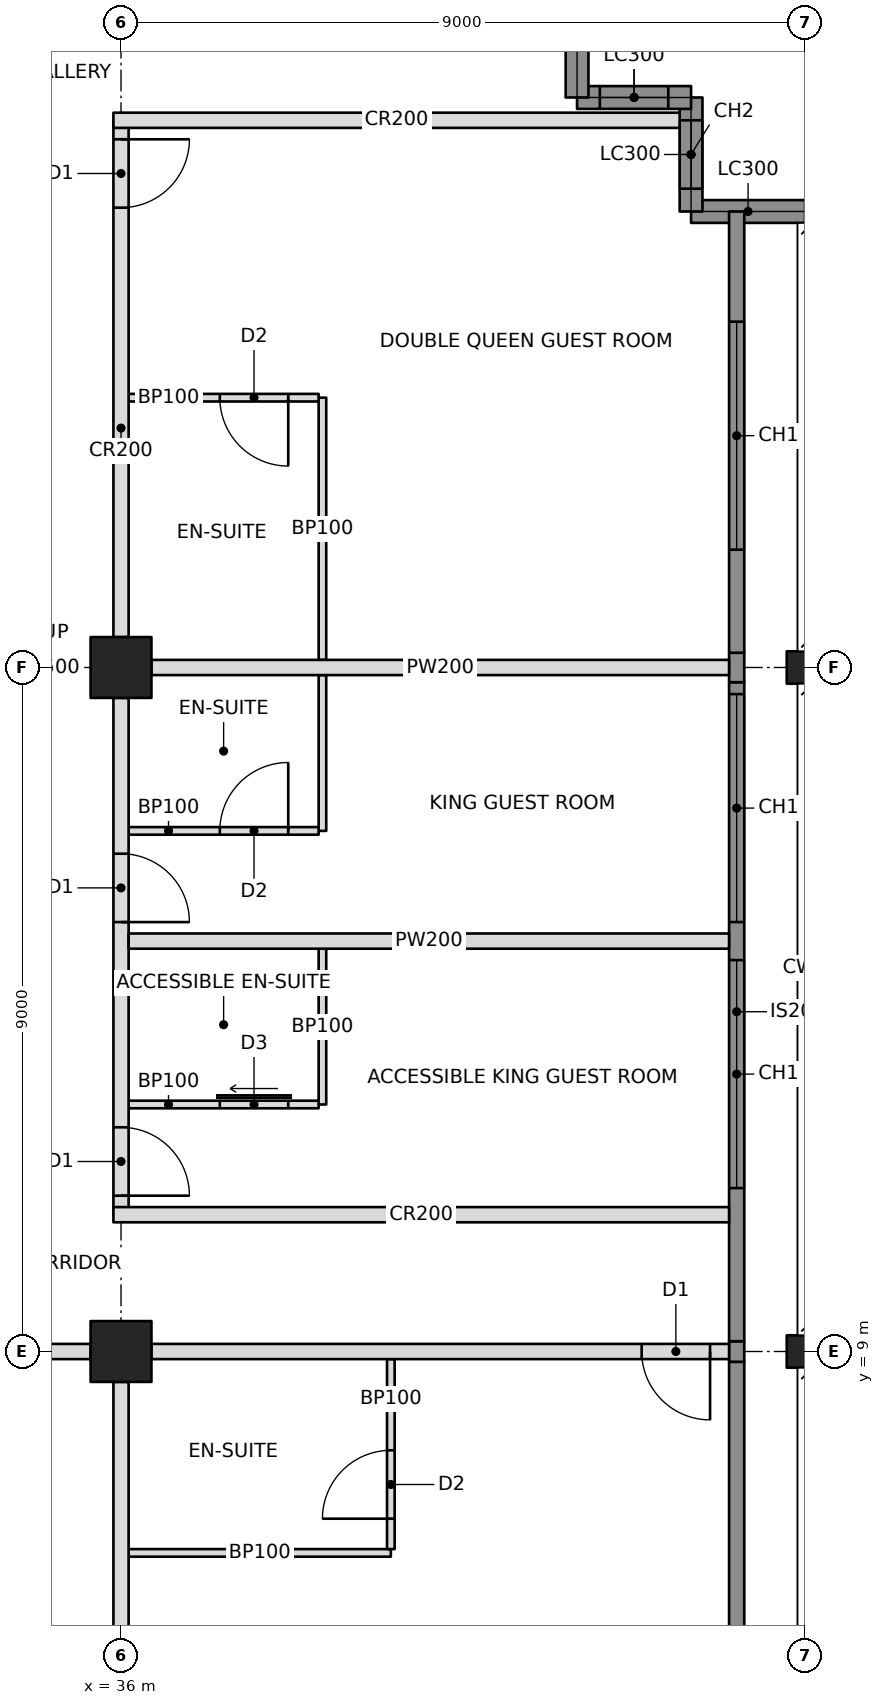
"""IFC4 building model, lengths in metres.
Left out: names, types, materials, properties, quantities, classifications, styles, units other than length and angle.
Written with IfcOpenShell. Run it as: python <this file> out.ifc"""

import sys

from ifc_helpers import new_model, si_unit, direction, frame, frame_2d, origin, origin_2d, place, context, subcontext, project, spatial, rectangle, hollow_rectangle, i_section, extrude, element, fill, save


model = new_model("IFC4")
c1 = context("Model", 3, precision=1e-05, world=origin(), true_north=direction((0.0, 1.0)))
c2 = subcontext(c1, "Body", "Model", "MODEL_VIEW")
j1 = project(units=[si_unit("LENGTHUNIT", "METRE"), si_unit("PLANEANGLEUNIT", "RADIAN")], contexts=[c1])
p1 = place(None, origin())
s1 = spatial("IfcSite", under=j1, at=p1, CompositionType="ELEMENT")
p2 = place(p1, origin())
s2 = spatial("IfcBuilding", under=s1, at=p2, CompositionType="ELEMENT")
p3 = place(p2, frame((0.0, 0.0, 194.4)))
s3 = spatial("IfcBuildingStorey", under=s2, at=p3, CompositionType="ELEMENT", Elevation=194.4)
for number, where, z_axis, x_axis in (
    (1, (36.0, 9.0, 0.0), (0.0, 0.0, 1.0), (0.0, 1.0, 0.0)),
    (2, (36.0, 18.0, 0.0), (0.0, 0.0, 1.0), (0.0, 1.0, 0.0)),
):
    element("IfcColumn", number, at=place(p3, frame(where, z_axis=z_axis, x_axis=x_axis)), inside=s3, PredefinedType="COLUMN", context=c2, shape_type="SweptSolid", body=[
        extrude(hollow_rectangle(XDim=0.8, YDim=0.8, WallThickness=0.05, at=origin_2d()), origin(), (0.0, 0.0, 1.0), 3.4),
    ])
for number, where, z_axis, x_axis in (
    (3, (45.0, 9.0, 0.0), (0.0, 0.0, 1.0), (0.0, 1.0, 0.0)),
    (4, (45.0, 18.0, 0.0), (0.0, 0.0, 1.0), (0.0, 1.0, 0.0)),
):
    element("IfcColumn", number, at=place(p3, frame(where, z_axis=z_axis, x_axis=x_axis)), inside=s3, PredefinedType="COLUMN", context=c2, shape_type="SweptSolid", body=[
        extrude(i_section(OverallWidth=0.427, OverallDepth=0.483, WebThickness=0.051, FlangeThickness=0.082, at=origin_2d()), origin(), (0.0, 0.0, 1.0), 3.4),
    ])
p4 = place(p3, frame((45.0, 24.0, 0.0), z_axis=(0.0, 0.0, 1.0), x_axis=(-1.0, 0.0, 0.0)))
e5 = element("IfcWall", 5, at=p4, inside=s3, PredefinedType="SOLIDWALL", context=c2, shape_type="SweptSolid", body=[
    extrude(rectangle(XDim=1.5, YDim=0.3, at=frame_2d((0.75, 0.0))), origin(), (0.0, 0.0, 1.0), 2.42),
])
p5 = place(p3, frame((43.5, 24.0, 0.0), z_axis=(0.0, 0.0, 1.0), x_axis=(0.0, 1.0, 0.0)))
e6 = element("IfcWall", 6, at=p5, inside=s3, PredefinedType="SOLIDWALL", context=c2, shape_type="SweptSolid", body=[
    extrude(rectangle(XDim=1.5, YDim=0.3, at=frame_2d((0.75, 0.0))), origin(), (0.0, 0.0, 1.0), 3.2),
])
p6 = place(p5, frame((0.3, 0.0, 0.6)))
e7 = element("IfcOpeningElement", 7, at=p6, cuts=e6, PredefinedType="OPENING", context=c2, shape_type="SweptSolid", body=[
    extrude(rectangle(XDim=0.9, YDim=2.2, at=frame_2d((0.45, 1.1))), frame((0.0, 0.16, 0.0), z_axis=(0.0, -1.0, 0.0), x_axis=(1.0, 0.0, 0.0)), (0.0, 0.0, 1.0), 0.32),
])
p7 = place(p3, frame((43.5, 25.5, 0.0), z_axis=(0.0, 0.0, 1.0), x_axis=(-1.0, 0.0, 0.0)))
e8 = element("IfcWall", 8, at=p7, inside=s3, PredefinedType="SOLIDWALL", context=c2, shape_type="SweptSolid", body=[
    extrude(rectangle(XDim=1.5, YDim=0.3, at=frame_2d((0.75, 0.0))), origin(), (0.0, 0.0, 1.0), 3.2),
])
p8 = place(p7, frame((0.3, 0.0, 0.6)))
e9 = element("IfcOpeningElement", 9, at=p8, cuts=e8, PredefinedType="OPENING", context=c2, shape_type="SweptSolid", body=[
    extrude(rectangle(XDim=0.9, YDim=2.2, at=frame_2d((0.45, 1.1))), frame((0.0, 0.16, 0.0), z_axis=(0.0, -1.0, 0.0), x_axis=(1.0, 0.0, 0.0)), (0.0, 0.0, 1.0), 0.32),
])
p9 = place(p3, frame((42.0, 25.5, 0.0), z_axis=(0.0, 0.0, 1.0), x_axis=(0.0, 1.0, 0.0)))
e10 = element("IfcWall", 10, at=p9, inside=s3, PredefinedType="SOLIDWALL", context=c2, shape_type="SweptSolid", body=[
    extrude(rectangle(XDim=1.5, YDim=0.3, at=frame_2d((0.75, 0.0))), origin(), (0.0, 0.0, 1.0), 2.42),
])
p10 = place(p3, frame((27.4, 9.0, 0.0), z_axis=(0.0, 0.0, 1.0), x_axis=(1.0, 0.0, 0.0)))
e11 = element("IfcWall", 11, at=p10, inside=s3, PredefinedType="PARTITIONING", context=c2, shape_type="SweptSolid", body=[
    extrude(rectangle(XDim=8.2, YDim=0.2, at=frame_2d((4.1, 0.0))), origin(), (0.0, 0.0, 1.0), 2.405),
])
p11 = place(p10, frame((0.15, 0.0, 0.0)))
e12 = element("IfcOpeningElement", 12, at=p11, cuts=e11, PredefinedType="OPENING", context=c2, shape_type="SweptSolid", body=[
    extrude(rectangle(XDim=0.9, YDim=2.1, at=frame_2d((0.45, 1.05))), frame((0.0, 0.11, 0.0), z_axis=(0.0, -1.0, 0.0), x_axis=(1.0, 0.0, 0.0)), (0.0, 0.0, 1.0), 0.22),
])
p12 = place(p3, frame((36.4, 9.0, 0.0), z_axis=(0.0, 0.0, 1.0), x_axis=(1.0, 0.0, 0.0)))
e13 = element("IfcWall", 13, at=p12, inside=s3, PredefinedType="PARTITIONING", context=c2, shape_type="SweptSolid", body=[
    extrude(rectangle(XDim=7.6, YDim=0.2, at=frame_2d((3.8, 0.0))), origin(), (0.0, 0.0, 1.0), 2.438),
])
p13 = place(p12, frame((6.45, 0.0, 0.0)))
e14 = element("IfcOpeningElement", 14, at=p13, cuts=e13, PredefinedType="OPENING", context=c2, shape_type="SweptSolid", body=[
    extrude(rectangle(XDim=0.9, YDim=2.1, at=frame_2d((0.45, 1.05))), frame((0.0, 0.11, 0.0), z_axis=(0.0, -1.0, 0.0), x_axis=(1.0, 0.0, 0.0)), (0.0, 0.0, 1.0), 0.22),
])
p14 = place(p3, frame((36.0, 10.8, 0.0), z_axis=(0.0, 0.0, 1.0), x_axis=(0.0, 1.0, 0.0)))
e15 = element("IfcWall", 15, at=p14, inside=s3, PredefinedType="PARTITIONING", context=c2, shape_type="SweptSolid", body=[
    extrude(rectangle(XDim=6.8, YDim=0.2, at=frame_2d((3.4, 0.0))), origin(), (0.0, 0.0, 1.0), 2.405),
])
p15 = place(p14, frame((0.25, 0.0, 0.0)))
e16 = element("IfcOpeningElement", 16, at=p15, cuts=e15, PredefinedType="OPENING", context=c2, shape_type="SweptSolid", body=[
    extrude(rectangle(XDim=0.9, YDim=2.1, at=frame_2d((0.45, 1.05))), frame((0.0, 0.11, 0.0), z_axis=(0.0, -1.0, 0.0), x_axis=(1.0, 0.0, 0.0)), (0.0, 0.0, 1.0), 0.22),
])
p16 = place(p14, frame((3.85, 0.0, 0.0)))
e17 = element("IfcOpeningElement", 17, at=p16, cuts=e15, PredefinedType="OPENING", context=c2, shape_type="SweptSolid", body=[
    extrude(rectangle(XDim=0.9, YDim=2.1, at=frame_2d((0.45, 1.05))), frame((0.0, 0.11, 0.0), z_axis=(0.0, -1.0, 0.0), x_axis=(1.0, 0.0, 0.0)), (0.0, 0.0, 1.0), 0.22),
])
p17 = place(p3, frame((36.0, 18.4, 0.0), z_axis=(0.0, 0.0, 1.0), x_axis=(0.0, 1.0, 0.0)))
e18 = element("IfcWall", 18, at=p17, inside=s3, PredefinedType="PARTITIONING", context=c2, shape_type="SweptSolid", body=[
    extrude(rectangle(XDim=6.8, YDim=0.2, at=frame_2d((3.4, 0.0))), origin(), (0.0, 0.0, 1.0), 2.405),
])
p18 = place(p17, frame((5.65, 0.0, 0.0)))
e19 = element("IfcOpeningElement", 19, at=p18, cuts=e18, PredefinedType="OPENING", context=c2, shape_type="SweptSolid", body=[
    extrude(rectangle(XDim=0.9, YDim=2.1, at=frame_2d((0.45, 1.05))), frame((0.0, 0.11, 0.0), z_axis=(0.0, -1.0, 0.0), x_axis=(1.0, 0.0, 0.0)), (0.0, 0.0, 1.0), 0.22),
])
p19 = place(p3, frame((35.9, 10.8, 0.0), z_axis=(0.0, 0.0, 1.0), x_axis=(1.0, 0.0, 0.0)))
e20 = element("IfcWall", 20, at=p19, inside=s3, PredefinedType="PARTITIONING", context=c2, shape_type="SweptSolid", body=[
    extrude(rectangle(XDim=8.1, YDim=0.2, at=frame_2d((4.05, 0.0))), origin(), (0.0, 0.0, 1.0), 2.404),
])
p20 = place(p3, frame((35.9, 25.2, 0.0), z_axis=(0.0, 0.0, 1.0), x_axis=(1.0, 0.0, 0.0)))
e21 = element("IfcWall", 21, at=p20, inside=s3, PredefinedType="PARTITIONING", context=c2, shape_type="SweptSolid", body=[
    extrude(rectangle(XDim=7.45, YDim=0.2, at=frame_2d((3.725, 0.0))), origin(), (0.0, 0.0, 1.0), 2.404),
])
p21 = place(p3, frame((36.0, 8.6, 0.0), z_axis=(0.0, 0.0, 1.0), x_axis=(0.0, -1.0, 0.0)))
e22 = element("IfcWall", 22, at=p21, inside=s3, PredefinedType="PARTITIONING", context=c2, shape_type="SweptSolid", body=[
    extrude(rectangle(XDim=7.6, YDim=0.2, at=frame_2d((3.8, 0.0))), origin(), (0.0, 0.0, 1.0), 2.438),
])
p22 = place(p3, frame((36.1, 6.35, 0.0), z_axis=(0.0, 0.0, 1.0), x_axis=(1.0, 0.0, 0.0)))
e23 = element("IfcWall", 23, at=p22, inside=s3, PredefinedType="PARTITIONING", context=c2, shape_type="SweptSolid", body=[
    extrude(rectangle(XDim=3.45, YDim=0.1, at=frame_2d((1.725, 0.0))), origin(), (0.0, 0.0, 1.0), 2.438),
])
p23 = place(p3, frame((39.55, 8.9, 0.0), z_axis=(0.0, 0.0, 1.0), x_axis=(0.0, -1.0, 0.0)))
e24 = element("IfcWall", 24, at=p23, inside=s3, PredefinedType="PARTITIONING", context=c2, shape_type="SweptSolid", body=[
    extrude(rectangle(XDim=2.5, YDim=0.1, at=frame_2d((1.25, 0.0))), origin(), (0.0, 0.0, 1.0), 2.438),
])
p24 = place(p23, frame((1.2, 0.0, 0.0)))
e25 = element("IfcOpeningElement", 25, at=p24, cuts=e24, PredefinedType="OPENING", context=c2, shape_type="SweptSolid", body=[
    extrude(rectangle(XDim=0.9, YDim=2.1, at=frame_2d((0.45, 1.05))), frame((0.0, 0.06, 0.0), z_axis=(0.0, -1.0, 0.0), x_axis=(1.0, 0.0, 0.0)), (0.0, 0.0, 1.0), 0.12),
])
p25 = place(p3, frame((36.1, 14.4, 0.0), z_axis=(0.0, 0.0, 1.0), x_axis=(1.0, 0.0, 0.0)))
e26 = element("IfcWall", 26, at=p25, inside=s3, PredefinedType="PARTITIONING", context=c2, shape_type="SweptSolid", body=[
    extrude(rectangle(XDim=7.9, YDim=0.2, at=frame_2d((3.95, 0.0))), origin(), (0.0, 0.0, 1.0), 2.404),
])
p26 = place(p3, frame((36.4, 18.0, 0.0), z_axis=(0.0, 0.0, 1.0), x_axis=(1.0, 0.0, 0.0)))
e27 = element("IfcWall", 27, at=p26, inside=s3, PredefinedType="PARTITIONING", context=c2, shape_type="SweptSolid", body=[
    extrude(rectangle(XDim=7.6, YDim=0.2, at=frame_2d((3.8, 0.0))), origin(), (0.0, 0.0, 1.0), 2.405),
])
p27 = place(p3, frame((38.65, 12.25, 0.0), z_axis=(0.0, 0.0, 1.0), x_axis=(0.0, 1.0, 0.0)))
e28 = element("IfcWall", 28, at=p27, inside=s3, PredefinedType="PARTITIONING", context=c2, shape_type="SweptSolid", body=[
    extrude(rectangle(XDim=2.05, YDim=0.1, at=frame_2d((1.025, 0.0))), origin(), (0.0, 0.0, 1.0), 3.2),
])
p28 = place(p3, frame((36.1, 12.25, 0.0), z_axis=(0.0, 0.0, 1.0), x_axis=(1.0, 0.0, 0.0)))
e29 = element("IfcWall", 29, at=p28, inside=s3, PredefinedType="PARTITIONING", context=c2, shape_type="SweptSolid", body=[
    extrude(rectangle(XDim=2.5, YDim=0.1, at=frame_2d((1.25, 0.0))), origin(), (0.0, 0.0, 1.0), 2.404),
])
p29 = place(p28, frame((1.2, 0.0, 0.0)))
e30 = element("IfcOpeningElement", 30, at=p29, cuts=e29, PredefinedType="OPENING", context=c2, shape_type="SweptSolid", body=[
    extrude(rectangle(XDim=0.9, YDim=2.1, at=frame_2d((0.45, 1.05))), frame((0.0, 0.06, 0.0), z_axis=(0.0, -1.0, 0.0), x_axis=(1.0, 0.0, 0.0)), (0.0, 0.0, 1.0), 0.12),
])
p30 = place(p3, frame((38.65, 15.85, 0.0), z_axis=(0.0, 0.0, 1.0), x_axis=(0.0, 1.0, 0.0)))
e31 = element("IfcWall", 31, at=p30, inside=s3, PredefinedType="PARTITIONING", context=c2, shape_type="SweptSolid", body=[
    extrude(rectangle(XDim=2.05, YDim=0.1, at=frame_2d((1.025, 0.0))), origin(), (0.0, 0.0, 1.0), 2.404),
])
p31 = place(p3, frame((36.1, 15.85, 0.0), z_axis=(0.0, 0.0, 1.0), x_axis=(1.0, 0.0, 0.0)))
e32 = element("IfcWall", 32, at=p31, inside=s3, PredefinedType="PARTITIONING", context=c2, shape_type="SweptSolid", body=[
    extrude(rectangle(XDim=2.5, YDim=0.1, at=frame_2d((1.25, 0.0))), origin(), (0.0, 0.0, 1.0), 2.404),
])
p32 = place(p31, frame((1.2, 0.0, 0.0)))
e33 = element("IfcOpeningElement", 33, at=p32, cuts=e32, PredefinedType="OPENING", context=c2, shape_type="SweptSolid", body=[
    extrude(rectangle(XDim=0.9, YDim=2.1, at=frame_2d((0.45, 1.05))), frame((0.0, 0.06, 0.0), z_axis=(0.0, -1.0, 0.0), x_axis=(1.0, 0.0, 0.0)), (0.0, 0.0, 1.0), 0.12),
])
p33 = place(p3, frame((38.65, 18.1, 0.0), z_axis=(0.0, 0.0, 1.0), x_axis=(0.0, 1.0, 0.0)))
e34 = element("IfcWall", 34, at=p33, inside=s3, PredefinedType="PARTITIONING", context=c2, shape_type="SweptSolid", body=[
    extrude(rectangle(XDim=3.45, YDim=0.1, at=frame_2d((1.725, 0.0))), origin(), (0.0, 0.0, 1.0), 2.404),
])
p34 = place(p3, frame((36.1, 21.55, 0.0), z_axis=(0.0, 0.0, 1.0), x_axis=(1.0, 0.0, 0.0)))
e35 = element("IfcWall", 35, at=p34, inside=s3, PredefinedType="PARTITIONING", context=c2, shape_type="SweptSolid", body=[
    extrude(rectangle(XDim=2.5, YDim=0.1, at=frame_2d((1.25, 0.0))), origin(), (0.0, 0.0, 1.0), 2.404),
])
p35 = place(p34, frame((1.2, 0.0, 0.0)))
e36 = element("IfcOpeningElement", 36, at=p35, cuts=e35, PredefinedType="OPENING", context=c2, shape_type="SweptSolid", body=[
    extrude(rectangle(XDim=0.9, YDim=2.1, at=frame_2d((0.45, 1.05))), frame((0.0, 0.06, 0.0), z_axis=(0.0, -1.0, 0.0), x_axis=(1.0, 0.0, 0.0)), (0.0, 0.0, 1.0), 0.12),
])
p36 = place(p3, frame((44.1, 4.607, 0.0), z_axis=(0.0, 0.0, 1.0), x_axis=(0.0, 1.0, 0.0)))
e37 = element("IfcWall", 37, at=p36, inside=s3, PredefinedType="SOLIDWALL", context=c2, shape_type="SweptSolid", body=[
    extrude(rectangle(XDim=4.257, YDim=0.2, at=frame_2d((2.129, 0.0))), origin(), (0.0, 0.0, 1.0), 3.2),
])
p37 = place(p3, frame((44.1, 8.865, 0.0), z_axis=(0.0, 0.0, 1.0), x_axis=(0.0, 1.0, 0.0)))
e38 = element("IfcWall", 38, at=p37, inside=s3, PredefinedType="SOLIDWALL", context=c2, shape_type="SweptSolid", body=[
    extrude(rectangle(XDim=0.271, YDim=0.2, at=frame_2d((0.135, 0.0))), origin(), (0.0, 0.0, 1.0), 2.438),
])
p38 = place(p3, frame((44.1, 9.135, 0.0), z_axis=(0.0, 0.0, 1.0), x_axis=(0.0, 1.0, 0.0)))
e39 = element("IfcWall", 39, at=p38, inside=s3, PredefinedType="SOLIDWALL", context=c2, shape_type="SweptSolid", body=[
    extrude(rectangle(XDim=8.671, YDim=0.2, at=frame_2d((4.335, 0.0))), origin(), (0.0, 0.0, 1.0), 3.2),
])
p39 = place(p38, frame((2.015, 0.0, 0.6)))
e40 = element("IfcOpeningElement", 40, at=p39, cuts=e39, PredefinedType="OPENING", context=c2, shape_type="SweptSolid", body=[
    extrude(rectangle(XDim=3.0, YDim=2.2, at=frame_2d((1.5, 1.1))), frame((0.0, 0.11, 0.0), z_axis=(0.0, -1.0, 0.0), x_axis=(1.0, 0.0, 0.0)), (0.0, 0.0, 1.0), 0.22),
])
p40 = place(p38, frame((5.515, 0.0, 0.6)))
e41 = element("IfcOpeningElement", 41, at=p40, cuts=e39, PredefinedType="OPENING", context=c2, shape_type="SweptSolid", body=[
    extrude(rectangle(XDim=3.0, YDim=2.2, at=frame_2d((1.5, 1.1))), frame((0.0, 0.11, 0.0), z_axis=(0.0, -1.0, 0.0), x_axis=(1.0, 0.0, 0.0)), (0.0, 0.0, 1.0), 0.22),
])
p41 = place(p3, frame((44.1, 17.806, 0.0), z_axis=(0.0, 0.0, 1.0), x_axis=(0.0, 1.0, 0.0)))
e42 = element("IfcWall", 42, at=p41, inside=s3, PredefinedType="SOLIDWALL", context=c2, shape_type="SweptSolid", body=[
    extrude(rectangle(XDim=0.388, YDim=0.2, at=frame_2d((0.194, 0.0))), origin(), (0.0, 0.0, 1.0), 2.404),
])
p42 = place(p3, frame((44.1, 18.194, 0.0), z_axis=(0.0, 0.0, 1.0), x_axis=(0.0, 1.0, 0.0)))
e43 = element("IfcWall", 43, at=p42, inside=s3, PredefinedType="SOLIDWALL", context=c2, shape_type="SweptSolid", body=[
    extrude(rectangle(XDim=5.806, YDim=0.2, at=frame_2d((2.903, 0.0))), origin(), (0.0, 0.0, 1.0), 3.2),
])
p43 = place(p42, frame((1.356, 0.0, 0.6)))
e44 = element("IfcOpeningElement", 44, at=p43, cuts=e43, PredefinedType="OPENING", context=c2, shape_type="SweptSolid", body=[
    extrude(rectangle(XDim=3.0, YDim=2.2, at=frame_2d((1.5, 1.1))), frame((0.0, 0.11, 0.0), z_axis=(0.0, -1.0, 0.0), x_axis=(1.0, 0.0, 0.0)), (0.0, 0.0, 1.0), 0.22),
])
p44 = place(p6, origin())
e45 = element("IfcWindow", 45, at=p44, inside=s3, PartitioningType="SINGLE_PANEL", PredefinedType="WINDOW", context=c2, shape_type="SweptSolid", body=[
    extrude(rectangle(XDim=0.9, YDim=2.2, at=frame_2d((0.45, 1.1))), frame((0.0, 0.03, 0.0), z_axis=(0.0, -1.0, 0.0), x_axis=(1.0, 0.0, 0.0)), (0.0, 0.0, 1.0), 0.06),
])
fill(e7, e45)
p45 = place(p8, origin())
e46 = element("IfcWindow", 46, at=p45, inside=s3, PartitioningType="SINGLE_PANEL", PredefinedType="WINDOW", context=c2, shape_type="SweptSolid", body=[
    extrude(rectangle(XDim=0.9, YDim=2.2, at=frame_2d((0.45, 1.1))), frame((0.0, 0.03, 0.0), z_axis=(0.0, -1.0, 0.0), x_axis=(1.0, 0.0, 0.0)), (0.0, 0.0, 1.0), 0.06),
])
fill(e9, e46)
p46 = place(p39, origin())
e47 = element("IfcWindow", 47, at=p46, inside=s3, PartitioningType="TRIPLE_PANEL_VERTICAL", PredefinedType="WINDOW", context=c2, shape_type="SweptSolid", body=[
    extrude(rectangle(XDim=3.0, YDim=2.2, at=frame_2d((1.5, 1.1))), frame((0.0, 0.03, 0.0), z_axis=(0.0, -1.0, 0.0), x_axis=(1.0, 0.0, 0.0)), (0.0, 0.0, 1.0), 0.06),
])
fill(e40, e47)
p47 = place(p40, origin())
e48 = element("IfcWindow", 48, at=p47, inside=s3, PartitioningType="TRIPLE_PANEL_VERTICAL", PredefinedType="WINDOW", context=c2, shape_type="SweptSolid", body=[
    extrude(rectangle(XDim=3.0, YDim=2.2, at=frame_2d((1.5, 1.1))), frame((0.0, 0.03, 0.0), z_axis=(0.0, -1.0, 0.0), x_axis=(1.0, 0.0, 0.0)), (0.0, 0.0, 1.0), 0.06),
])
fill(e41, e48)
p48 = place(p43, origin())
e49 = element("IfcWindow", 49, at=p48, inside=s3, PartitioningType="TRIPLE_PANEL_VERTICAL", PredefinedType="WINDOW", context=c2, shape_type="SweptSolid", body=[
    extrude(rectangle(XDim=3.0, YDim=2.2, at=frame_2d((1.5, 1.1))), frame((0.0, 0.03, 0.0), z_axis=(0.0, -1.0, 0.0), x_axis=(1.0, 0.0, 0.0)), (0.0, 0.0, 1.0), 0.06),
])
fill(e44, e49)
p49 = place(p24, frame((0.9, 0.0, 0.0), z_axis=(0.0, 0.0, 1.0), x_axis=(-1.0, 0.0, 0.0)))
e50 = element("IfcDoor", 50, at=p49, inside=s3, OperationType="SINGLE_SWING_LEFT", PredefinedType="DOOR", context=c2, shape_type="SweptSolid", body=[
    extrude(rectangle(XDim=0.9, YDim=2.1, at=frame_2d((0.45, 1.05))), frame((0.0, 0.025, 0.0), z_axis=(0.0, -1.0, 0.0), x_axis=(1.0, 0.0, 0.0)), (0.0, 0.0, 1.0), 0.05),
])
fill(e25, e50)
p50 = place(p13, frame((0.9, 0.0, 0.0), z_axis=(0.0, 0.0, 1.0), x_axis=(-1.0, 0.0, 0.0)))
e51 = element("IfcDoor", 51, at=p50, inside=s3, OperationType="SINGLE_SWING_LEFT", PredefinedType="DOOR", context=c2, shape_type="SweptSolid", body=[
    extrude(rectangle(XDim=0.9, YDim=2.1, at=frame_2d((0.45, 1.05))), frame((0.0, 0.025, 0.0), z_axis=(0.0, -1.0, 0.0), x_axis=(1.0, 0.0, 0.0)), (0.0, 0.0, 1.0), 0.05),
])
fill(e14, e51)
p51 = place(p29, origin())
e52 = element("IfcDoor", 52, at=p51, inside=s3, OperationType="SLIDING_TO_LEFT", PredefinedType="DOOR", context=c2, shape_type="SweptSolid", body=[
    extrude(rectangle(XDim=0.9, YDim=2.1, at=frame_2d((0.45, 1.05))), frame((0.0, 0.025, 0.0), z_axis=(0.0, -1.0, 0.0), x_axis=(1.0, 0.0, 0.0)), (0.0, 0.0, 1.0), 0.05),
])
fill(e30, e52)
p52 = place(p15, frame((0.9, 0.0, 0.0), z_axis=(0.0, 0.0, 1.0), x_axis=(-1.0, 0.0, 0.0)))
e53 = element("IfcDoor", 53, at=p52, inside=s3, OperationType="SINGLE_SWING_RIGHT", PredefinedType="DOOR", context=c2, shape_type="SweptSolid", body=[
    extrude(rectangle(XDim=0.9, YDim=2.1, at=frame_2d((0.45, 1.05))), frame((0.0, 0.025, 0.0), z_axis=(0.0, -1.0, 0.0), x_axis=(1.0, 0.0, 0.0)), (0.0, 0.0, 1.0), 0.05),
])
fill(e16, e53)
p53 = place(p32, origin())
e54 = element("IfcDoor", 54, at=p53, inside=s3, OperationType="SINGLE_SWING_RIGHT", PredefinedType="DOOR", context=c2, shape_type="SweptSolid", body=[
    extrude(rectangle(XDim=0.9, YDim=2.1, at=frame_2d((0.45, 1.05))), frame((0.0, 0.025, 0.0), z_axis=(0.0, -1.0, 0.0), x_axis=(1.0, 0.0, 0.0)), (0.0, 0.0, 1.0), 0.05),
])
fill(e33, e54)
p54 = place(p16, frame((0.9, 0.0, 0.0), z_axis=(0.0, 0.0, 1.0), x_axis=(-1.0, 0.0, 0.0)))
e55 = element("IfcDoor", 55, at=p54, inside=s3, OperationType="SINGLE_SWING_RIGHT", PredefinedType="DOOR", context=c2, shape_type="SweptSolid", body=[
    extrude(rectangle(XDim=0.9, YDim=2.1, at=frame_2d((0.45, 1.05))), frame((0.0, 0.025, 0.0), z_axis=(0.0, -1.0, 0.0), x_axis=(1.0, 0.0, 0.0)), (0.0, 0.0, 1.0), 0.05),
])
fill(e17, e55)
p55 = place(p35, frame((0.9, 0.0, 0.0), z_axis=(0.0, 0.0, 1.0), x_axis=(-1.0, 0.0, 0.0)))
e56 = element("IfcDoor", 56, at=p55, inside=s3, OperationType="SINGLE_SWING_LEFT", PredefinedType="DOOR", context=c2, shape_type="SweptSolid", body=[
    extrude(rectangle(XDim=0.9, YDim=2.1, at=frame_2d((0.45, 1.05))), frame((0.0, 0.025, 0.0), z_axis=(0.0, -1.0, 0.0), x_axis=(1.0, 0.0, 0.0)), (0.0, 0.0, 1.0), 0.05),
])
fill(e36, e56)
p56 = place(p18, frame((0.9, 0.0, 0.0), z_axis=(0.0, 0.0, 1.0), x_axis=(-1.0, 0.0, 0.0)))
e57 = element("IfcDoor", 57, at=p56, inside=s3, OperationType="SINGLE_SWING_LEFT", PredefinedType="DOOR", context=c2, shape_type="SweptSolid", body=[
    extrude(rectangle(XDim=0.9, YDim=2.1, at=frame_2d((0.45, 1.05))), frame((0.0, 0.025, 0.0), z_axis=(0.0, -1.0, 0.0), x_axis=(1.0, 0.0, 0.0)), (0.0, 0.0, 1.0), 0.05),
])
fill(e19, e57)
save(model, sys.argv[1])
